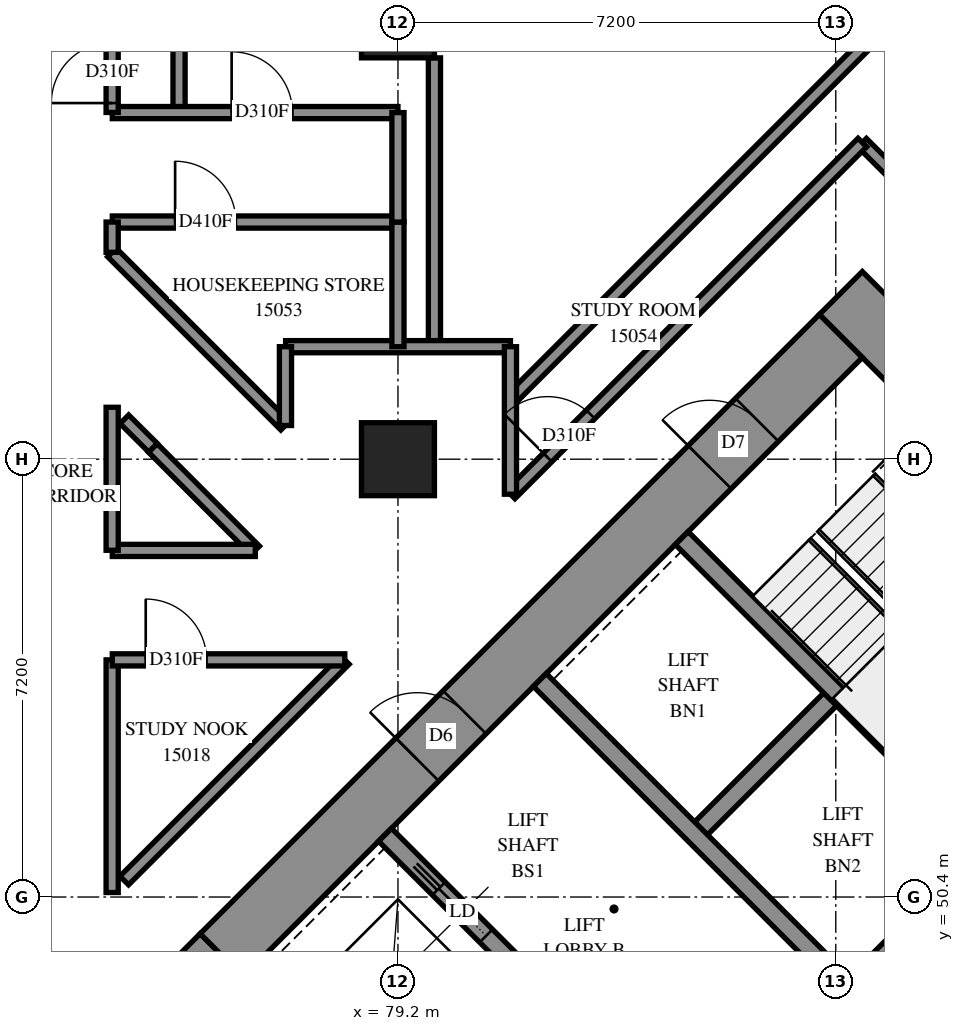
"""IFC4 building model, lengths in metres.
Left out: names, types, materials, properties, quantities, classifications, styles, units other than length and angle.
Written with IfcOpenShell. Run it as: python <this file> out.ifc"""

import sys

from ifc_helpers import new_model, si_unit, direction, frame, frame_2d, origin, origin_2d, place, context, subcontext, project, spatial, polyline, rectangle, outline, extrude, element, fill, save


model = new_model("IFC4")
c1 = context("Model", 3, precision=1e-05, world=origin(), true_north=direction((0.0, 1.0)))
c2 = subcontext(c1, "Body", "Model", "MODEL_VIEW")
j1 = project(units=[si_unit("LENGTHUNIT", "METRE"), si_unit("PLANEANGLEUNIT", "RADIAN")], contexts=[c1])
p1 = place(None, origin())
s1 = spatial("IfcSite", under=j1, at=p1, CompositionType="ELEMENT")
p2 = place(p1, origin())
s2 = spatial("IfcBuilding", under=s1, at=p2, CompositionType="ELEMENT")
p3 = place(p2, frame((0.0, 0.0, 57.6)))
s3 = spatial("IfcBuildingStorey", under=s2, at=p3, CompositionType="ELEMENT", Elevation=57.6)
for number, where, z_axis, x_axis in (
    (1, (79.2, 57.6, 0.0), (0.0, 0.0, 1.0), (1.0, 0.0, 0.0)),
    (2, (79.2, 64.8, 0.0), (0.0, 0.0, 1.0), (1.0, 0.0, 0.0)),
):
    element("IfcColumn", number, at=place(p3, frame(where, z_axis=z_axis, x_axis=x_axis)), inside=s3, PredefinedType="COLUMN", context=c2, shape_type="SweptSolid", body=[
        extrude(rectangle(XDim=1.2, YDim=1.2, at=origin_2d()), origin(), (0.0, 0.0, 1.0), 3.1),
    ])
p4 = place(p3, frame((75.594, 49.443, -0.3), z_axis=(0.0, 0.0, 1.0), x_axis=(0.7071037324, -0.70710983, 0.0)))
e3 = element("IfcWall", 3, at=p4, inside=s3, PredefinedType="SHEAR", context=c2, shape_type="SweptSolid", body=[
    extrude(rectangle(XDim=16.4, YDim=1.0, at=frame_2d((8.2, 0.0))), origin(), (0.0, 0.0, 1.0), 2.7),
])
p5 = place(p3, frame((86.483, 60.333, -0.3), z_axis=(0.0, 0.0, 1.0), x_axis=(0.70710983, -0.7071037324, 0.0)))
e4 = element("IfcWall", 4, at=p5, inside=s3, PredefinedType="SHEAR", context=c2, shape_type="SweptSolid", body=[
    extrude(rectangle(XDim=16.4, YDim=1.0, at=frame_2d((8.2, 0.0))), origin(), (0.0, 0.0, 1.0), 2.7),
])
p6 = place(p5, frame((11.0, 0.0, 0.3)))
e5 = element("IfcOpeningElement", 5, at=p6, cuts=e4, PredefinedType="OPENING", context=c2, shape_type="SweptSolid", body=[
    extrude(rectangle(XDim=0.8, YDim=2.1, at=frame_2d((0.4, 1.05))), frame((0.0, 0.51, 0.0), z_axis=(0.0, -1.0, 0.0), x_axis=(1.0, 0.0, 0.0)), (0.0, 0.0, 1.0), 1.02),
])
p7 = place(p3, frame((76.301, 49.443, -0.3), z_axis=(0.0, 0.0, 1.0), x_axis=(0.7071067812, 0.7071067812, 0.0)))
e6 = element("IfcWall", 6, at=p7, inside=s3, PredefinedType="SHEAR", context=c2, shape_type="SweptSolid", body=[
    extrude(rectangle(XDim=14.4, YDim=1.0, at=frame_2d((7.2, 0.0))), origin(), (0.0, 0.0, 1.0), 2.7),
])
p8 = place(p7, frame((4.55, 0.0, 0.3)))
e7 = element("IfcOpeningElement", 7, at=p8, cuts=e6, PredefinedType="OPENING", context=c2, shape_type="SweptSolid", body=[
    extrude(rectangle(XDim=1.1, YDim=2.1, at=frame_2d((0.55, 1.05))), frame((0.0, 0.51, 0.0), z_axis=(0.0, -1.0, 0.0), x_axis=(1.0, 0.0, 0.0)), (0.0, 0.0, 1.0), 1.02),
])
p9 = place(p7, frame((11.35, 0.0, 0.3)))
e8 = element("IfcOpeningElement", 8, at=p9, cuts=e6, PredefinedType="OPENING", context=c2, shape_type="SweptSolid", body=[
    extrude(rectangle(XDim=1.1, YDim=2.1, at=frame_2d((0.55, 1.05))), frame((0.0, 0.51, 0.0), z_axis=(0.0, -1.0, 0.0), x_axis=(1.0, 0.0, 0.0)), (0.0, 0.0, 1.0), 1.02),
])
p10 = place(p3, frame((84.079, 51.423, 0.0), z_axis=(0.0, 0.0, 1.0), x_axis=(0.7071219326, 0.7070916295, 0.0)))
e9 = element("IfcWall", 9, at=p10, inside=s3, PredefinedType="SOLIDWALL", context=c2, shape_type="SweptSolid", body=[
    extrude(rectangle(XDim=3.3, YDim=0.3, at=frame_2d((1.65, 0.0))), origin(), (0.0, 0.0, 1.0), 3.1),
])
p11 = place(p3, frame((86.625, 48.878, 0.0), z_axis=(0.0, 0.0, 1.0), x_axis=(0.7071067812, 0.7071067812, 0.0)))
e10 = element("IfcWall", 10, at=p11, inside=s3, PredefinedType="SOLIDWALL", context=c2, shape_type="SweptSolid", body=[
    extrude(rectangle(XDim=3.3, YDim=0.3, at=frame_2d((1.65, 0.0))), origin(), (0.0, 0.0, 1.0), 3.1),
])
p12 = place(p3, frame((78.988, 51.423, 0.0), z_axis=(0.0, 0.0, 1.0), x_axis=(0.7071067812, -0.7071067812, 0.0)))
e11 = element("IfcWall", 11, at=p12, inside=s3, PredefinedType="SOLIDWALL", context=c2, shape_type="SweptSolid", body=[
    extrude(rectangle(XDim=14.4, YDim=0.3, at=frame_2d((7.2, 0.0))), origin(), (0.0, 0.0, 1.0), 3.1),
])
p13 = place(p12, frame((1.25, 0.0, 0.0)))
e12 = element("IfcOpeningElement", 12, at=p13, cuts=e11, PredefinedType="OPENING", context=c2, shape_type="SweptSolid", body=[
    extrude(rectangle(XDim=1.1, YDim=2.1, at=frame_2d((0.55, 1.05))), frame((0.0, 0.16, 0.0), z_axis=(0.0, -1.0, 0.0), x_axis=(1.0, 0.0, 0.0)), (0.0, 0.0, 1.0), 0.32),
])
p14 = place(p12, frame((4.85, 0.0, 0.0)))
e13 = element("IfcOpeningElement", 13, at=p14, cuts=e11, PredefinedType="OPENING", context=c2, shape_type="SweptSolid", body=[
    extrude(rectangle(XDim=1.1, YDim=2.1, at=frame_2d((0.55, 1.05))), frame((0.0, 0.16, 0.0), z_axis=(0.0, -1.0, 0.0), x_axis=(1.0, 0.0, 0.0)), (0.0, 0.0, 1.0), 0.32),
])
p15 = place(p12, frame((8.45, 0.0, 0.0)))
e14 = element("IfcOpeningElement", 14, at=p15, cuts=e11, PredefinedType="OPENING", context=c2, shape_type="SweptSolid", body=[
    extrude(rectangle(XDim=1.1, YDim=2.1, at=frame_2d((0.55, 1.05))), frame((0.0, 0.16, 0.0), z_axis=(0.0, -1.0, 0.0), x_axis=(1.0, 0.0, 0.0)), (0.0, 0.0, 1.0), 0.32),
])
p16 = place(p12, frame((12.05, 0.0, 0.0)))
e15 = element("IfcOpeningElement", 15, at=p16, cuts=e11, PredefinedType="OPENING", context=c2, shape_type="SweptSolid", body=[
    extrude(rectangle(XDim=1.1, YDim=2.1, at=frame_2d((0.55, 1.05))), frame((0.0, 0.16, 0.0), z_axis=(0.0, -1.0, 0.0), x_axis=(1.0, 0.0, 0.0)), (0.0, 0.0, 1.0), 0.32),
])
p17 = place(p3, frame((81.534, 53.969, 0.0), z_axis=(0.0, 0.0, 1.0), x_axis=(0.707103309, -0.7071102534, 0.0)))
e16 = element("IfcWall", 16, at=p17, inside=s3, PredefinedType="SOLIDWALL", context=c2, shape_type="SweptSolid", body=[
    extrude(rectangle(XDim=14.4, YDim=0.3, at=frame_2d((7.2, 0.0))), origin(), (0.0, 0.0, 1.0), 3.1),
])
p18 = place(p17, frame((12.05, 0.0, 0.0)))
e17 = element("IfcOpeningElement", 17, at=p18, cuts=e16, PredefinedType="OPENING", context=c2, shape_type="SweptSolid", body=[
    extrude(rectangle(XDim=1.1, YDim=2.1, at=frame_2d((0.55, 1.05))), frame((0.0, 0.16, 0.0), z_axis=(0.0, -1.0, 0.0), x_axis=(1.0, 0.0, 0.0)), (0.0, 0.0, 1.0), 0.32),
])
p19 = place(p3, frame((83.867, 56.302, 0.0), z_axis=(0.0, 0.0, 1.0), x_axis=(0.7071137256, -0.7070998367, 0.0)))
e18 = element("IfcWall", 18, at=p19, inside=s3, PredefinedType="SOLIDWALL", context=c2, shape_type="SweptSolid", body=[
    extrude(rectangle(XDim=7.2, YDim=0.3, at=frame_2d((3.6, 0.0))), origin(), (0.0, 0.0, 1.0), 3.1),
])
p20 = place(p3, frame((89.281, 64.031, 0.0), z_axis=(0.0, 0.0, 1.0), x_axis=(-0.8136209625, 0.5813956737, 0.0)))
e19 = element("IfcWall", 19, at=p20, inside=s3, PredefinedType="SOLIDWALL", context=c2, shape_type="SweptSolid", body=[
    extrude(outline(polyline([(-0.046, -0.275), (3.438, -0.275), (3.53, 0.275), (0.046, 0.275), (-0.046, -0.275)])), origin(), (0.0, 0.0, 1.0), 3.1),
])
p21 = place(p20, frame((0.518, 0.0, 0.5)))
e20 = element("IfcOpeningElement", 20, at=p21, cuts=e19, PredefinedType="OPENING", context=c2, shape_type="SweptSolid", body=[
    extrude(rectangle(XDim=1.2, YDim=2.45, at=frame_2d((0.6, 1.225))), frame((0.0, 0.285, 0.0), z_axis=(0.0, -1.0, 0.0), x_axis=(1.0, 0.0, 0.0)), (0.0, 0.0, 1.0), 0.57),
])
p22 = place(p3, frame((86.833, 62.805, 0.0), z_axis=(0.0, 0.0, 1.0), x_axis=(0.7072045138, -0.7070090351, 0.0)))
e21 = element("IfcWall", 21, at=p22, inside=s3, PredefinedType="PARTITIONING", context=c2, shape_type="SweptSolid", body=[
    extrude(rectangle(XDim=13.301, YDim=0.2, at=frame_2d((6.65, 0.0))), origin(), (0.0, 0.0, 1.0), 3.1),
])
p23 = place(p22, frame((10.586, 0.0, 0.0)))
e22 = element("IfcOpeningElement", 22, at=p23, cuts=e21, PredefinedType="OPENING", context=c2, shape_type="SweptSolid", body=[
    extrude(rectangle(XDim=1.0, YDim=2.1, at=frame_2d((0.5, 1.05))), frame((0.0, 0.11, 0.0), z_axis=(0.0, -1.0, 0.0), x_axis=(1.0, 0.0, 0.0)), (0.0, 0.0, 1.0), 0.22),
])
p24 = place(p3, frame((75.6, 63.3, 0.0), z_axis=(0.0, 0.0, 1.0), x_axis=(0.0, 1.0, 0.0)))
e23 = element("IfcWall", 23, at=p24, inside=s3, PredefinedType="PARTITIONING", context=c2, shape_type="SweptSolid", body=[
    extrude(rectangle(XDim=9.46, YDim=0.2, at=frame_2d((4.73, 0.0))), origin(), (0.0, 0.0, 1.0), 3.1),
])
p25 = place(p3, frame((81.049, 58.577, 0.0), z_axis=(0.0, 0.0, 1.0), x_axis=(0.7071122929, 0.7071012694, 0.0)))
e24 = element("IfcWall", 24, at=p25, inside=s3, PredefinedType="PARTITIONING", context=c2, shape_type="SweptSolid", body=[
    extrude(rectangle(XDim=9.072, YDim=0.2, at=frame_2d((4.536, 0.0))), origin(), (0.0, 0.0, 1.0), 3.1),
])
p26 = place(p3, frame((81.053, 57.021, 0.0), z_axis=(0.0, 0.0, 1.0), x_axis=(0.7069845395, 0.7072290017, 0.0)))
e25 = element("IfcWall", 25, at=p26, inside=s3, PredefinedType="PARTITIONING", context=c2, shape_type="SweptSolid", body=[
    extrude(rectangle(XDim=8.181, YDim=0.2, at=frame_2d((4.091, 0.0))), origin(), (0.0, 0.0, 1.0), 3.1),
])
p27 = place(p26, frame((0.86, 0.0, 0.0)))
e26 = element("IfcOpeningElement", 26, at=p27, cuts=e25, PredefinedType="OPENING", context=c2, shape_type="SweptSolid", body=[
    extrude(rectangle(XDim=1.0, YDim=2.1, at=frame_2d((0.5, 1.05))), frame((0.0, 0.11, 0.0), z_axis=(0.0, -1.0, 0.0), x_axis=(1.0, 0.0, 0.0)), (0.0, 0.0, 1.0), 0.22),
])
p28 = place(p3, frame((74.699, 50.671, 0.0), z_axis=(0.0, 0.0, 1.0), x_axis=(0.7071067812, 0.7071067812, 0.0)))
e27 = element("IfcWall", 27, at=p28, inside=s3, PredefinedType="PARTITIONING", context=c2, shape_type="SweptSolid", body=[
    extrude(rectangle(XDim=5.131, YDim=0.2, at=frame_2d((2.565, 0.0))), origin(), (0.0, 0.0, 1.0), 3.1),
])
p29 = place(p3, frame((79.8, 59.45, 0.0), z_axis=(0.0, 0.0, 1.0), x_axis=(0.0, 1.0, 0.0)))
e28 = element("IfcWall", 28, at=p29, inside=s3, PredefinedType="PARTITIONING", context=c2, shape_type="SweptSolid", body=[
    extrude(rectangle(XDim=4.75, YDim=0.2, at=frame_2d((2.375, 0.0))), origin(), (0.0, 0.0, 1.0), 3.1),
])
p30 = place(p3, frame((74.502, 63.3, 0.0), z_axis=(0.0, 0.0, 1.0), x_axis=(1.0, 0.0, 0.0)))
e29 = element("IfcWall", 29, at=p30, inside=s3, PredefinedType="PARTITIONING", context=c2, shape_type="SweptSolid", body=[
    extrude(rectangle(XDim=4.698, YDim=0.2, at=frame_2d((2.349, 0.0))), origin(), (0.0, 0.0, 1.0), 3.1),
])
p31 = place(p30, frame((1.963, 0.0, 0.0)))
e30 = element("IfcOpeningElement", 30, at=p31, cuts=e29, PredefinedType="OPENING", context=c2, shape_type="SweptSolid", body=[
    extrude(rectangle(XDim=1.0, YDim=2.1, at=frame_2d((0.5, 1.05))), frame((0.0, 0.11, 0.0), z_axis=(0.0, -1.0, 0.0), x_axis=(1.0, 0.0, 0.0)), (0.0, 0.0, 1.0), 0.22),
])
p32 = place(p3, frame((74.502, 61.5, 0.0), z_axis=(0.0, 0.0, 1.0), x_axis=(1.0, 0.0, 0.0)))
e31 = element("IfcWall", 31, at=p32, inside=s3, PredefinedType="PARTITIONING", context=c2, shape_type="SweptSolid", body=[
    extrude(rectangle(XDim=4.698, YDim=0.2, at=frame_2d((2.349, 0.0))), origin(), (0.0, 0.0, 1.0), 3.1),
])
p33 = place(p32, frame((1.034, 0.0, 0.0)))
e32 = element("IfcOpeningElement", 32, at=p33, cuts=e31, PredefinedType="OPENING", context=c2, shape_type="SweptSolid", body=[
    extrude(rectangle(XDim=1.0, YDim=2.1, at=frame_2d((0.5, 1.05))), frame((0.0, 0.11, 0.0), z_axis=(0.0, -1.0, 0.0), x_axis=(1.0, 0.0, 0.0)), (0.0, 0.0, 1.0), 0.22),
])
p34 = place(p3, frame((74.497, 60.999, 0.0), z_axis=(0.0, 0.0, 1.0), x_axis=(0.7071067812, -0.7071067812, 0.0)))
e33 = element("IfcWall", 33, at=p34, inside=s3, PredefinedType="PARTITIONING", context=c2, shape_type="SweptSolid", body=[
    extrude(rectangle(XDim=4.028, YDim=0.2, at=frame_2d((2.014, 0.0))), origin(), (0.0, 0.0, 1.0), 3.1),
])
p35 = place(p3, frame((74.5, 63.302, 0.0), z_axis=(0.0, 0.0, 1.0), x_axis=(0.0, 1.0, 0.0)))
e34 = element("IfcWall", 34, at=p35, inside=s3, PredefinedType="PARTITIONING", context=c2, shape_type="SweptSolid", body=[
    extrude(rectangle(XDim=3.998, YDim=0.2, at=frame_2d((1.999, 0.0))), origin(), (0.0, 0.0, 1.0), 3.1),
])
p36 = place(p35, frame((0.154, 0.0, 0.0)))
e35 = element("IfcOpeningElement", 35, at=p36, cuts=e34, PredefinedType="OPENING", context=c2, shape_type="SweptSolid", body=[
    extrude(rectangle(XDim=1.0, YDim=2.1, at=frame_2d((0.5, 1.05))), frame((0.0, 0.11, 0.0), z_axis=(0.0, -1.0, 0.0), x_axis=(1.0, 0.0, 0.0)), (0.0, 0.0, 1.0), 0.22),
])
p37 = place(p3, frame((74.5, 50.474, 0.0), z_axis=(0.0, 0.0, 1.0), x_axis=(0.0, 1.0, 0.0)))
e36 = element("IfcWall", 36, at=p37, inside=s3, PredefinedType="PARTITIONING", context=c2, shape_type="SweptSolid", body=[
    extrude(rectangle(XDim=3.826, YDim=0.2, at=frame_2d((1.913, 0.0))), origin(), (0.0, 0.0, 1.0), 3.1),
])
p38 = place(p3, frame((74.502, 54.3, 0.0), z_axis=(0.0, 0.0, 1.0), x_axis=(1.0, 0.0, 0.0)))
e37 = element("IfcWall", 37, at=p38, inside=s3, PredefinedType="PARTITIONING", context=c2, shape_type="SweptSolid", body=[
    extrude(rectangle(XDim=3.824, YDim=0.2, at=frame_2d((1.912, 0.0))), origin(), (0.0, 0.0, 1.0), 3.1),
])
p39 = place(p38, frame((0.55, 0.0, 0.0)))
e38 = element("IfcOpeningElement", 38, at=p39, cuts=e37, PredefinedType="OPENING", context=c2, shape_type="SweptSolid", body=[
    extrude(rectangle(XDim=1.0, YDim=2.1, at=frame_2d((0.5, 1.05))), frame((0.0, 0.11, 0.0), z_axis=(0.0, -1.0, 0.0), x_axis=(1.0, 0.0, 0.0)), (0.0, 0.0, 1.0), 0.22),
])
p40 = place(p3, frame((77.352, 59.45, 0.0), z_axis=(0.0, 0.0, 1.0), x_axis=(1.0, 0.0, 0.0)))
e39 = element("IfcWall", 39, at=p40, inside=s3, PredefinedType="PARTITIONING", context=c2, shape_type="SweptSolid", body=[
    extrude(rectangle(XDim=3.698, YDim=0.2, at=frame_2d((1.849, 0.0))), origin(), (0.0, 0.0, 1.0), 3.1),
])
p41 = place(p3, frame((81.05, 57.024, 0.0), z_axis=(0.0, 0.0, 1.0), x_axis=(0.0, 1.0, 0.0)))
e40 = element("IfcWall", 40, at=p41, inside=s3, PredefinedType="PARTITIONING", context=c2, shape_type="SweptSolid", body=[
    extrude(rectangle(XDim=2.426, YDim=0.2, at=frame_2d((1.213, 0.0))), origin(), (0.0, 0.0, 1.0), 3.1),
])
p42 = place(p3, frame((75.168, 57.786, 0.0), z_axis=(0.0, 0.0, 1.0), x_axis=(0.7066870088, -0.7075263045, 0.0)))
e41 = element("IfcWall", 41, at=p42, inside=s3, PredefinedType="PARTITIONING", context=c2, shape_type="SweptSolid", body=[
    extrude(rectangle(XDim=2.383, YDim=0.2, at=frame_2d((1.192, 0.0))), origin(), (0.0, 0.0, 1.0), 3.1),
])
for number, where, z_axis, x_axis in (
    (42, (74.502, 56.1, 0.0), (0.0, 0.0, 1.0), (1.0, 0.0, 0.0)),
    (43, (74.5, 56.102, 0.0), (0.0, 0.0, 1.0), (0.0, 1.0, 0.0)),
):
    element("IfcWall", number, at=place(p3, frame(where, z_axis=z_axis, x_axis=x_axis)), inside=s3, PredefinedType="PARTITIONING", context=c2, shape_type="SweptSolid", body=[
        extrude(rectangle(XDim=2.352, YDim=0.2, at=frame_2d((1.176, 0.0))), origin(), (0.0, 0.0, 1.0), 3.1),
    ])
p43 = place(p3, frame((79.2, 59.45, 0.0), z_axis=(0.0, 0.0, 1.0), x_axis=(0.0, 1.0, 0.0)))
e44 = element("IfcWall", 44, at=p43, inside=s3, PredefinedType="PARTITIONING", context=c2, shape_type="SweptSolid", body=[
    extrude(rectangle(XDim=2.05, YDim=0.2, at=frame_2d((1.025, 0.0))), origin(), (0.0, 0.0, 1.0), 3.1),
])
p44 = place(p3, frame((79.2, 61.5, 0.0), z_axis=(0.0, 0.0, 1.0), x_axis=(0.0, 1.0, 0.0)))
e45 = element("IfcWall", 45, at=p44, inside=s3, PredefinedType="PARTITIONING", context=c2, shape_type="SweptSolid", body=[
    extrude(rectangle(XDim=1.8, YDim=0.2, at=frame_2d((0.9, 0.0))), origin(), (0.0, 0.0, 1.0), 3.1),
])
p45 = place(p3, frame((77.35, 58.154, 0.0), z_axis=(0.0, 0.0, 1.0), x_axis=(0.0, 1.0, 0.0)))
e46 = element("IfcWall", 46, at=p45, inside=s3, PredefinedType="PARTITIONING", context=c2, shape_type="SweptSolid", body=[
    extrude(rectangle(XDim=1.296, YDim=0.2, at=frame_2d((0.648, 0.0))), origin(), (0.0, 0.0, 1.0), 3.1),
])
p46 = place(p3, frame((74.701, 58.257, 0.0), z_axis=(0.0, 0.0, 1.0), x_axis=(0.7086128608, -0.7055974869, 0.0)))
e47 = element("IfcWall", 47, at=p46, inside=s3, PredefinedType="PARTITIONING", context=c2, shape_type="SweptSolid", body=[
    extrude(rectangle(XDim=0.663, YDim=0.2, at=frame_2d((0.332, 0.0))), origin(), (0.0, 0.0, 1.0), 3.1),
])
p47 = place(p3, frame((74.5, 61.002, 0.0), z_axis=(0.0, 0.0, 1.0), x_axis=(0.0, 1.0, 0.0)))
e48 = element("IfcWall", 48, at=p47, inside=s3, PredefinedType="PARTITIONING", context=c2, shape_type="SweptSolid", body=[
    extrude(rectangle(XDim=0.498, YDim=0.2, at=frame_2d((0.249, 0.0))), origin(), (0.0, 0.0, 1.0), 3.1),
])
p48 = place(p8, origin())
e49 = element("IfcDoor", 49, at=p48, inside=s3, OperationType="DOUBLE_DOOR_SINGLE_SWING", PredefinedType="DOOR", context=c2, shape_type="SweptSolid", body=[
    extrude(rectangle(XDim=1.1, YDim=2.1, at=frame_2d((0.55, 1.05))), frame((0.0, 0.025, 0.0), z_axis=(0.0, -1.0, 0.0), x_axis=(1.0, 0.0, 0.0)), (0.0, 0.0, 1.0), 0.05),
])
fill(e7, e49)
p49 = place(p9, origin())
e50 = element("IfcDoor", 50, at=p49, inside=s3, OperationType="SINGLE_SWING_LEFT", PredefinedType="DOOR", context=c2, shape_type="SweptSolid", body=[
    extrude(rectangle(XDim=1.1, YDim=2.1, at=frame_2d((0.55, 1.05))), frame((0.0, 0.025, 0.0), z_axis=(0.0, -1.0, 0.0), x_axis=(1.0, 0.0, 0.0)), (0.0, 0.0, 1.0), 0.05),
])
fill(e8, e50)
p50 = place(p13, origin())
e51 = element("IfcDoor", 51, at=p50, inside=s3, OperationType="SLIDING_TO_LEFT", PredefinedType="DOOR", context=c2, shape_type="SweptSolid", body=[
    extrude(rectangle(XDim=1.1, YDim=2.1, at=frame_2d((0.55, 1.05))), frame((0.0, 0.025, 0.0), z_axis=(0.0, -1.0, 0.0), x_axis=(1.0, 0.0, 0.0)), (0.0, 0.0, 1.0), 0.05),
])
fill(e12, e51)
p51 = place(p39, origin())
e52 = element("IfcDoor", 52, at=p51, inside=s3, OperationType="SINGLE_SWING_RIGHT", PredefinedType="DOOR", context=c2, shape_type="SweptSolid", body=[
    extrude(rectangle(XDim=1.0, YDim=2.1, at=frame_2d((0.5, 1.05))), frame((0.0, 0.025, 0.0), z_axis=(0.0, -1.0, 0.0), x_axis=(1.0, 0.0, 0.0)), (0.0, 0.0, 1.0), 0.05),
])
fill(e38, e52)
p52 = place(p36, origin())
e53 = element("IfcDoor", 53, at=p52, inside=s3, OperationType="SINGLE_SWING_RIGHT", PredefinedType="DOOR", context=c2, shape_type="SweptSolid", body=[
    extrude(rectangle(XDim=1.0, YDim=2.1, at=frame_2d((0.5, 1.05))), frame((0.0, 0.025, 0.0), z_axis=(0.0, -1.0, 0.0), x_axis=(1.0, 0.0, 0.0)), (0.0, 0.0, 1.0), 0.05),
])
fill(e35, e53)
p53 = place(p31, origin())
e54 = element("IfcDoor", 54, at=p53, inside=s3, OperationType="SINGLE_SWING_LEFT", PredefinedType="DOOR", context=c2, shape_type="SweptSolid", body=[
    extrude(rectangle(XDim=1.0, YDim=2.1, at=frame_2d((0.5, 1.05))), frame((0.0, 0.025, 0.0), z_axis=(0.0, -1.0, 0.0), x_axis=(1.0, 0.0, 0.0)), (0.0, 0.0, 1.0), 0.05),
])
fill(e30, e54)
p54 = place(p33, origin())
e55 = element("IfcDoor", 55, at=p54, inside=s3, OperationType="SINGLE_SWING_RIGHT", PredefinedType="DOOR", context=c2, shape_type="SweptSolid", body=[
    extrude(rectangle(XDim=1.0, YDim=2.1, at=frame_2d((0.5, 1.05))), frame((0.0, 0.025, 0.0), z_axis=(0.0, -1.0, 0.0), x_axis=(1.0, 0.0, 0.0)), (0.0, 0.0, 1.0), 0.05),
])
fill(e32, e55)
p55 = place(p27, origin())
e56 = element("IfcDoor", 56, at=p55, inside=s3, OperationType="SINGLE_SWING_RIGHT", PredefinedType="DOOR", context=c2, shape_type="SweptSolid", body=[
    extrude(rectangle(XDim=1.0, YDim=2.1, at=frame_2d((0.5, 1.05))), frame((0.0, 0.025, 0.0), z_axis=(0.0, -1.0, 0.0), x_axis=(1.0, 0.0, 0.0)), (0.0, 0.0, 1.0), 0.05),
])
fill(e26, e56)
save(model, sys.argv[1])
